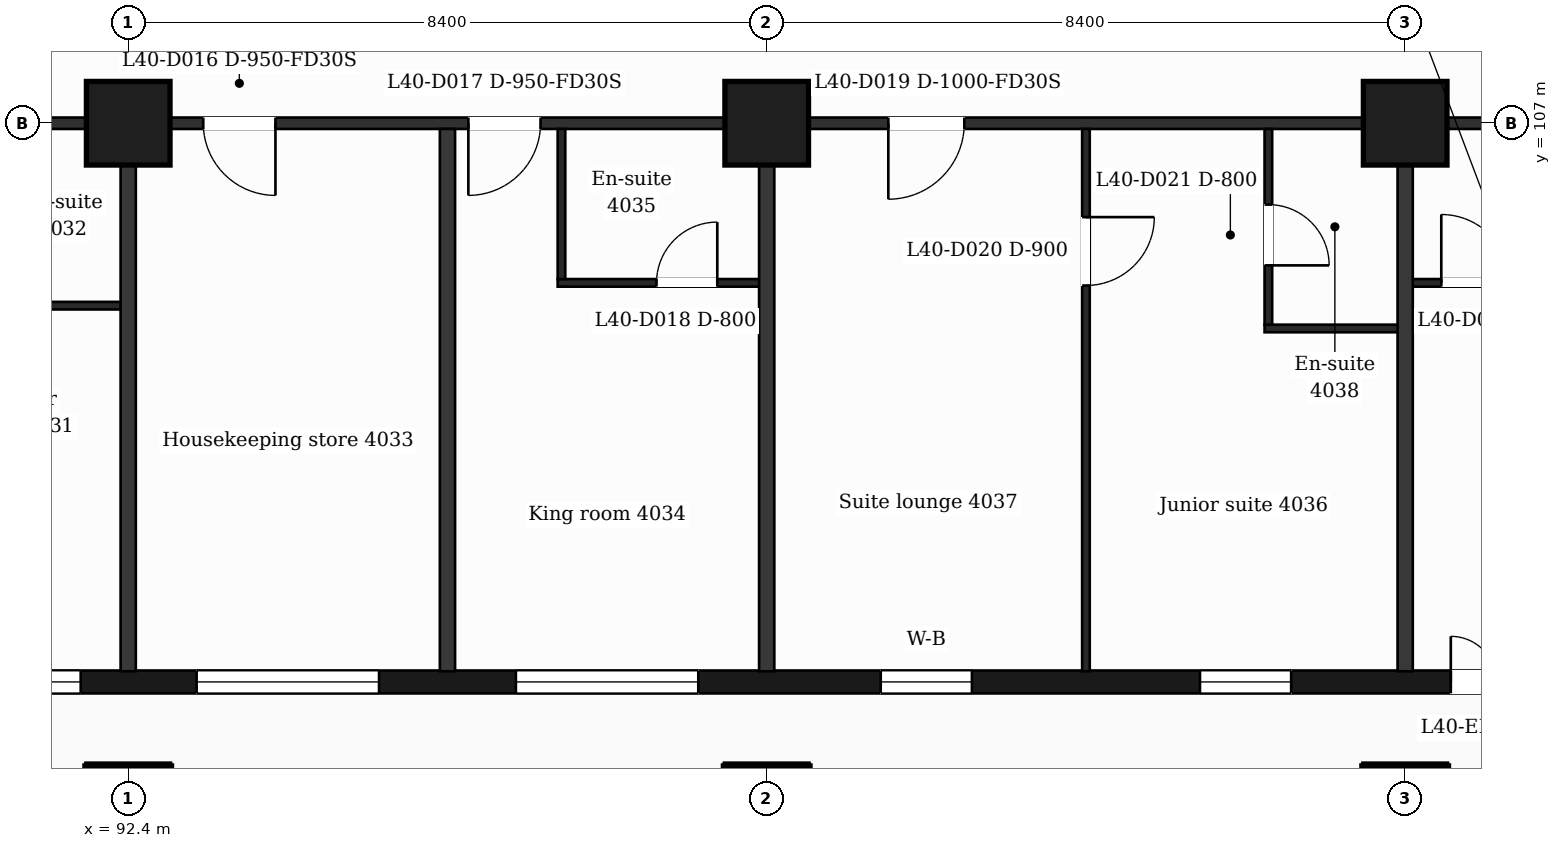
"""IFC4 building model, lengths in metres.
Left out: names, types, materials, properties, quantities, classifications, styles, units other than length and angle.
Written with IfcOpenShell. Run it as: python <this file> out.ifc"""

import sys

from ifc_helpers import new_model, si_unit, direction, frame, frame_2d, origin, origin_2d, place, context, subcontext, project, spatial, rectangle, extrude, element, fill, save


model = new_model("IFC4")
c1 = context("Model", 3, precision=1e-05, world=origin(), true_north=direction((0.0, 1.0)))
c2 = subcontext(c1, "Body", "Model", "MODEL_VIEW")
j1 = project(units=[si_unit("LENGTHUNIT", "METRE"), si_unit("PLANEANGLEUNIT", "RADIAN")], contexts=[c1])
p1 = place(None, origin())
s1 = spatial("IfcSite", under=j1, at=p1, CompositionType="ELEMENT")
p2 = place(p1, origin())
s2 = spatial("IfcBuilding", under=s1, at=p2, CompositionType="ELEMENT")
p3 = place(p2, frame((0.0, 0.0, 170.0)))
s3 = spatial("IfcBuildingStorey", under=s2, at=p3, CompositionType="ELEMENT", Elevation=170.0)
for number, where, z_axis, x_axis in (
    (1, (92.4, 98.0, 0.0), (0.0, 0.0, 1.0), (1.0, 0.0, 0.0)),
    (2, (100.8, 98.0, 0.0), (0.0, 0.0, 1.0), (1.0, 0.0, 0.0)),
    (3, (109.2, 98.0, 0.0), (0.0, 0.0, 1.0), (1.0, 0.0, 0.0)),
    (4, (92.4, 107.0, 0.0), (0.0, 0.0, 1.0), (1.0, 0.0, 0.0)),
    (5, (100.8, 107.0, 0.0), (0.0, 0.0, 1.0), (1.0, 0.0, 0.0)),
    (6, (109.2, 107.0, 0.0), (0.0, 0.0, 1.0), (1.0, 0.0, 0.0)),
):
    element("IfcColumn", number, at=place(p3, frame(where, z_axis=z_axis, x_axis=x_axis)), inside=s3, PredefinedType="COLUMN", context=c2, shape_type="SweptSolid", body=[
        extrude(rectangle(XDim=1.1, YDim=1.1, at=origin_2d()), origin(), (0.0, 0.0, 1.0), 3.7),
    ])
p4 = place(p3, frame((89.85, 99.65, 0.0), z_axis=(0.0, 0.0, 1.0), x_axis=(1.0, 0.0, 0.0)))
e7 = element("IfcWall", 7, at=p4, inside=s3, PredefinedType="SOLIDWALL", context=c2, shape_type="SweptSolid", body=[
    extrude(rectangle(XDim=47.25, YDim=0.3, at=frame_2d((23.625, 0.0))), origin(), (0.0, 0.0, 1.0), 3.38),
])
p5 = place(p4, frame((0.725, 0.0, 0.9)))
e8 = element("IfcOpeningElement", 8, at=p5, cuts=e7, PredefinedType="OPENING", context=c2, shape_type="SweptSolid", body=[
    extrude(rectangle(XDim=1.2, YDim=2.1, at=frame_2d((0.6, 1.05))), frame((0.0, 0.16, 0.0), z_axis=(0.0, -1.0, 0.0), x_axis=(1.0, 0.0, 0.0)), (0.0, 0.0, 1.0), 0.32),
])
p6 = place(p4, frame((3.45, 0.0, 0.9)))
e9 = element("IfcOpeningElement", 9, at=p6, cuts=e7, PredefinedType="OPENING", context=c2, shape_type="SweptSolid", body=[
    extrude(rectangle(XDim=2.4, YDim=2.1, at=frame_2d((1.2, 1.05))), frame((0.0, 0.16, 0.0), z_axis=(0.0, -1.0, 0.0), x_axis=(1.0, 0.0, 0.0)), (0.0, 0.0, 1.0), 0.32),
])
p7 = place(p4, frame((7.65, 0.0, 0.9)))
e10 = element("IfcOpeningElement", 10, at=p7, cuts=e7, PredefinedType="OPENING", context=c2, shape_type="SweptSolid", body=[
    extrude(rectangle(XDim=2.4, YDim=2.1, at=frame_2d((1.2, 1.05))), frame((0.0, 0.16, 0.0), z_axis=(0.0, -1.0, 0.0), x_axis=(1.0, 0.0, 0.0)), (0.0, 0.0, 1.0), 0.32),
])
p8 = place(p4, frame((12.45, 0.0, 0.9)))
e11 = element("IfcOpeningElement", 11, at=p8, cuts=e7, PredefinedType="OPENING", context=c2, shape_type="SweptSolid", body=[
    extrude(rectangle(XDim=1.2, YDim=2.1, at=frame_2d((0.6, 1.05))), frame((0.0, 0.16, 0.0), z_axis=(0.0, -1.0, 0.0), x_axis=(1.0, 0.0, 0.0)), (0.0, 0.0, 1.0), 0.32),
])
p9 = place(p4, frame((16.65, 0.0, 0.9)))
e12 = element("IfcOpeningElement", 12, at=p9, cuts=e7, PredefinedType="OPENING", context=c2, shape_type="SweptSolid", body=[
    extrude(rectangle(XDim=1.2, YDim=2.1, at=frame_2d((0.6, 1.05))), frame((0.0, 0.16, 0.0), z_axis=(0.0, -1.0, 0.0), x_axis=(1.0, 0.0, 0.0)), (0.0, 0.0, 1.0), 0.32),
])
p10 = place(p4, frame((19.95, 0.0, 0.0)))
e13 = element("IfcOpeningElement", 13, at=p10, cuts=e7, PredefinedType="OPENING", context=c2, shape_type="SweptSolid", body=[
    extrude(rectangle(XDim=1.2, YDim=2.4, at=frame_2d((0.6, 1.2))), frame((0.0, 0.16, 0.0), z_axis=(0.0, -1.0, 0.0), x_axis=(1.0, 0.0, 0.0)), (0.0, 0.0, 1.0), 0.32),
])
p11 = place(p4, frame((21.75, 0.0, 0.9)))
e14 = element("IfcOpeningElement", 14, at=p11, cuts=e7, PredefinedType="OPENING", context=c2, shape_type="SweptSolid", body=[
    extrude(rectangle(XDim=1.2, YDim=2.1, at=frame_2d((0.6, 1.05))), frame((0.0, 0.16, 0.0), z_axis=(0.0, -1.0, 0.0), x_axis=(1.0, 0.0, 0.0)), (0.0, 0.0, 1.0), 0.32),
])
p12 = place(p4, frame((24.45, 0.0, 0.9)))
e15 = element("IfcOpeningElement", 15, at=p12, cuts=e7, PredefinedType="OPENING", context=c2, shape_type="SweptSolid", body=[
    extrude(rectangle(XDim=2.4, YDim=2.1, at=frame_2d((1.2, 1.05))), frame((0.0, 0.16, 0.0), z_axis=(0.0, -1.0, 0.0), x_axis=(1.0, 0.0, 0.0)), (0.0, 0.0, 1.0), 0.32),
])
p13 = place(p4, frame((28.35, 0.0, 0.0)))
e16 = element("IfcOpeningElement", 16, at=p13, cuts=e7, PredefinedType="OPENING", context=c2, shape_type="SweptSolid", body=[
    extrude(rectangle(XDim=1.2, YDim=2.4, at=frame_2d((0.6, 1.2))), frame((0.0, 0.16, 0.0), z_axis=(0.0, -1.0, 0.0), x_axis=(1.0, 0.0, 0.0)), (0.0, 0.0, 1.0), 0.32),
])
p14 = place(p4, frame((30.15, 0.0, 0.9)))
e17 = element("IfcOpeningElement", 17, at=p14, cuts=e7, PredefinedType="OPENING", context=c2, shape_type="SweptSolid", body=[
    extrude(rectangle(XDim=1.2, YDim=2.1, at=frame_2d((0.6, 1.05))), frame((0.0, 0.16, 0.0), z_axis=(0.0, -1.0, 0.0), x_axis=(1.0, 0.0, 0.0)), (0.0, 0.0, 1.0), 0.32),
])
p15 = place(p4, frame((32.85, 0.0, 0.9)))
e18 = element("IfcOpeningElement", 18, at=p15, cuts=e7, PredefinedType="OPENING", context=c2, shape_type="SweptSolid", body=[
    extrude(rectangle(XDim=2.4, YDim=2.1, at=frame_2d((1.2, 1.05))), frame((0.0, 0.16, 0.0), z_axis=(0.0, -1.0, 0.0), x_axis=(1.0, 0.0, 0.0)), (0.0, 0.0, 1.0), 0.32),
])
p16 = place(p4, frame((37.05, 0.0, 0.9)))
e19 = element("IfcOpeningElement", 19, at=p16, cuts=e7, PredefinedType="OPENING", context=c2, shape_type="SweptSolid", body=[
    extrude(rectangle(XDim=2.4, YDim=2.1, at=frame_2d((1.2, 1.05))), frame((0.0, 0.16, 0.0), z_axis=(0.0, -1.0, 0.0), x_axis=(1.0, 0.0, 0.0)), (0.0, 0.0, 1.0), 0.32),
])
p17 = place(p4, frame((41.85, 0.0, 0.9)))
e20 = element("IfcOpeningElement", 20, at=p17, cuts=e7, PredefinedType="OPENING", context=c2, shape_type="SweptSolid", body=[
    extrude(rectangle(XDim=1.2, YDim=2.1, at=frame_2d((0.6, 1.05))), frame((0.0, 0.16, 0.0), z_axis=(0.0, -1.0, 0.0), x_axis=(1.0, 0.0, 0.0)), (0.0, 0.0, 1.0), 0.32),
])
p18 = place(p4, frame((45.25, 0.0, 0.9)))
e21 = element("IfcOpeningElement", 21, at=p18, cuts=e7, PredefinedType="OPENING", context=c2, shape_type="SweptSolid", body=[
    extrude(rectangle(XDim=1.2, YDim=2.1, at=frame_2d((0.6, 1.05))), frame((0.0, 0.16, 0.0), z_axis=(0.0, -1.0, 0.0), x_axis=(1.0, 0.0, 0.0)), (0.0, 0.0, 1.0), 0.32),
])
p19 = place(p3, frame((107.35, 104.3, 0.0), z_axis=(0.0, 0.0, 1.0), x_axis=(1.0, 0.0, 0.0)))
e22 = element("IfcWall", 22, at=p19, inside=s3, PredefinedType="PARTITIONING", context=c2, shape_type="SweptSolid", body=[
    extrude(rectangle(XDim=1.85, YDim=0.1, at=frame_2d((0.925, 0.0))), origin(), (0.0, 0.0, 1.0), 3.38),
])
p20 = place(p3, frame((89.95, 104.6, 0.0), z_axis=(0.0, 0.0, 1.0), x_axis=(1.0, 0.0, 0.0)))
e23 = element("IfcWall", 23, at=p20, inside=s3, PredefinedType="PARTITIONING", context=c2, shape_type="SweptSolid", body=[
    extrude(rectangle(XDim=2.45, YDim=0.1, at=frame_2d((1.225, 0.0))), origin(), (0.0, 0.0, 1.0), 3.38),
])
p21 = place(p3, frame((98.05, 104.9, 0.0), z_axis=(0.0, 0.0, 1.0), x_axis=(1.0, 0.0, 0.0)))
e24 = element("IfcWall", 24, at=p21, inside=s3, PredefinedType="PARTITIONING", context=c2, shape_type="SweptSolid", body=[
    extrude(rectangle(XDim=2.75, YDim=0.1, at=frame_2d((1.375, 0.0))), origin(), (0.0, 0.0, 1.0), 3.38),
])
p22 = place(p21, frame((1.3, 0.0, 0.0)))
e25 = element("IfcOpeningElement", 25, at=p22, cuts=e24, PredefinedType="OPENING", context=c2, shape_type="SweptSolid", body=[
    extrude(rectangle(XDim=0.8, YDim=2.1, at=frame_2d((0.4, 1.05))), frame((0.0, 0.06, 0.0), z_axis=(0.0, -1.0, 0.0), x_axis=(1.0, 0.0, 0.0)), (0.0, 0.0, 1.0), 0.12),
])
p23 = place(p3, frame((109.2, 104.9, 0.0), z_axis=(0.0, 0.0, 1.0), x_axis=(1.0, 0.0, 0.0)))
e26 = element("IfcWall", 26, at=p23, inside=s3, PredefinedType="PARTITIONING", context=c2, shape_type="SweptSolid", body=[
    extrude(rectangle(XDim=2.15, YDim=0.1, at=frame_2d((1.075, 0.0))), origin(), (0.0, 0.0, 1.0), 3.38),
])
p24 = place(p23, frame((0.475, 0.0, 0.0)))
e27 = element("IfcOpeningElement", 27, at=p24, cuts=e26, PredefinedType="OPENING", context=c2, shape_type="SweptSolid", body=[
    extrude(rectangle(XDim=0.9, YDim=2.1, at=frame_2d((0.45, 1.05))), frame((0.0, 0.06, 0.0), z_axis=(0.0, -1.0, 0.0), x_axis=(1.0, 0.0, 0.0)), (0.0, 0.0, 1.0), 0.12),
])
p25 = place(p3, frame((87.018, 107.0, 0.0), z_axis=(0.0, 0.0, 1.0), x_axis=(1.0, 0.0, 0.0)))
e28 = element("IfcWall", 28, at=p25, inside=s3, PredefinedType="PARTITIONING", context=c2, shape_type="SweptSolid", body=[
    extrude(rectangle(XDim=52.765, YDim=0.15, at=frame_2d((26.382, 0.0))), origin(), (0.0, 0.0, 1.0), 3.38),
])
p26 = place(p25, frame((0.463, 0.0, 0.0)))
e29 = element("IfcOpeningElement", 29, at=p26, cuts=e28, PredefinedType="OPENING", context=c2, shape_type="SweptSolid", body=[
    extrude(rectangle(XDim=0.95, YDim=2.1, at=frame_2d((0.475, 1.05))), frame((0.0, 0.085, 0.0), z_axis=(0.0, -1.0, 0.0), x_axis=(1.0, 0.0, 0.0)), (0.0, 0.0, 1.0), 0.17),
])
p27 = place(p25, frame((6.369, 0.0, 0.0)))
e30 = element("IfcOpeningElement", 30, at=p27, cuts=e28, PredefinedType="OPENING", context=c2, shape_type="SweptSolid", body=[
    extrude(rectangle(XDim=0.95, YDim=2.1, at=frame_2d((0.475, 1.05))), frame((0.0, 0.085, 0.0), z_axis=(0.0, -1.0, 0.0), x_axis=(1.0, 0.0, 0.0)), (0.0, 0.0, 1.0), 0.17),
])
p28 = place(p25, frame((9.857, 0.0, 0.0)))
e31 = element("IfcOpeningElement", 31, at=p28, cuts=e28, PredefinedType="OPENING", context=c2, shape_type="SweptSolid", body=[
    extrude(rectangle(XDim=0.95, YDim=2.1, at=frame_2d((0.475, 1.05))), frame((0.0, 0.085, 0.0), z_axis=(0.0, -1.0, 0.0), x_axis=(1.0, 0.0, 0.0)), (0.0, 0.0, 1.0), 0.17),
])
p29 = place(p25, frame((15.382, 0.0, 0.0)))
e32 = element("IfcOpeningElement", 32, at=p29, cuts=e28, PredefinedType="OPENING", context=c2, shape_type="SweptSolid", body=[
    extrude(rectangle(XDim=1.0, YDim=2.1, at=frame_2d((0.5, 1.05))), frame((0.0, 0.085, 0.0), z_axis=(0.0, -1.0, 0.0), x_axis=(1.0, 0.0, 0.0)), (0.0, 0.0, 1.0), 0.17),
])
p30 = place(p25, frame((24.932, 0.0, 0.0)))
e33 = element("IfcOpeningElement", 33, at=p30, cuts=e28, PredefinedType="OPENING", context=c2, shape_type="SweptSolid", body=[
    extrude(rectangle(XDim=1.0, YDim=2.1, at=frame_2d((0.5, 1.05))), frame((0.0, 0.085, 0.0), z_axis=(0.0, -1.0, 0.0), x_axis=(1.0, 0.0, 0.0)), (0.0, 0.0, 1.0), 0.17),
])
p31 = place(p25, frame((27.819, 0.0, 0.0)))
e34 = element("IfcOpeningElement", 34, at=p31, cuts=e28, PredefinedType="OPENING", context=c2, shape_type="SweptSolid", body=[
    extrude(rectangle(XDim=0.95, YDim=2.1, at=frame_2d((0.475, 1.05))), frame((0.0, 0.085, 0.0), z_axis=(0.0, -1.0, 0.0), x_axis=(1.0, 0.0, 0.0)), (0.0, 0.0, 1.0), 0.17),
])
p32 = place(p25, frame((42.012, 0.0, 0.0)))
e35 = element("IfcOpeningElement", 35, at=p32, cuts=e28, PredefinedType="OPENING", context=c2, shape_type="SweptSolid", body=[
    extrude(rectangle(XDim=1.0, YDim=2.1, at=frame_2d((0.5, 1.05))), frame((0.0, 0.085, 0.0), z_axis=(0.0, -1.0, 0.0), x_axis=(1.0, 0.0, 0.0)), (0.0, 0.0, 1.0), 0.17),
])
p33 = place(p25, frame((48.249, 0.0, 0.0)))
e36 = element("IfcOpeningElement", 36, at=p33, cuts=e28, PredefinedType="OPENING", context=c2, shape_type="SweptSolid", body=[
    extrude(rectangle(XDim=0.95, YDim=2.1, at=frame_2d((0.475, 1.05))), frame((0.0, 0.085, 0.0), z_axis=(0.0, -1.0, 0.0), x_axis=(1.0, 0.0, 0.0)), (0.0, 0.0, 1.0), 0.17),
])
for number, where, z_axis, x_axis in (
    (37, (92.4, 99.79, 0.0), (0.0, 0.0, 1.0), (0.0, 1.0, 0.0)),
    (38, (96.6, 99.79, 0.0), (0.0, 0.0, 1.0), (0.0, 1.0, 0.0)),
):
    element("IfcWall", number, at=place(p3, frame(where, z_axis=z_axis, x_axis=x_axis)), inside=s3, PredefinedType="PARTITIONING", context=c2, shape_type="SweptSolid", body=[
        extrude(rectangle(XDim=7.135, YDim=0.2, at=frame_2d((3.567, 0.0))), origin(), (0.0, 0.0, 1.0), 3.38),
    ])
p34 = place(p3, frame((98.1, 104.95, 0.0), z_axis=(0.0, 0.0, 1.0), x_axis=(0.0, 1.0, 0.0)))
e39 = element("IfcWall", 39, at=p34, inside=s3, PredefinedType="PARTITIONING", context=c2, shape_type="SweptSolid", body=[
    extrude(rectangle(XDim=1.975, YDim=0.1, at=frame_2d((0.988, 0.0))), origin(), (0.0, 0.0, 1.0), 3.38),
])
p35 = place(p3, frame((100.8, 99.79, 0.0), z_axis=(0.0, 0.0, 1.0), x_axis=(0.0, 1.0, 0.0)))
e40 = element("IfcWall", 40, at=p35, inside=s3, PredefinedType="PARTITIONING", context=c2, shape_type="SweptSolid", body=[
    extrude(rectangle(XDim=7.135, YDim=0.2, at=frame_2d((3.567, 0.0))), origin(), (0.0, 0.0, 1.0), 3.38),
])
p36 = place(p3, frame((105.0, 99.79, 0.0), z_axis=(0.0, 0.0, 1.0), x_axis=(0.0, 1.0, 0.0)))
e41 = element("IfcWall", 41, at=p36, inside=s3, PredefinedType="PARTITIONING", context=c2, shape_type="SweptSolid", body=[
    extrude(rectangle(XDim=7.135, YDim=0.1, at=frame_2d((3.567, 0.0))), origin(), (0.0, 0.0, 1.0), 3.38),
])
p37 = place(p36, frame((5.075, 0.0, 0.0)))
e42 = element("IfcOpeningElement", 42, at=p37, cuts=e41, PredefinedType="OPENING", context=c2, shape_type="SweptSolid", body=[
    extrude(rectangle(XDim=0.9, YDim=2.1, at=frame_2d((0.45, 1.05))), frame((0.0, 0.06, 0.0), z_axis=(0.0, -1.0, 0.0), x_axis=(1.0, 0.0, 0.0)), (0.0, 0.0, 1.0), 0.12),
])
p38 = place(p3, frame((107.4, 104.35, 0.0), z_axis=(0.0, 0.0, 1.0), x_axis=(0.0, 1.0, 0.0)))
e43 = element("IfcWall", 43, at=p38, inside=s3, PredefinedType="PARTITIONING", context=c2, shape_type="SweptSolid", body=[
    extrude(rectangle(XDim=2.575, YDim=0.1, at=frame_2d((1.288, 0.0))), origin(), (0.0, 0.0, 1.0), 3.38),
])
p39 = place(p38, frame((0.78, 0.0, 0.0)))
e44 = element("IfcOpeningElement", 44, at=p39, cuts=e43, PredefinedType="OPENING", context=c2, shape_type="SweptSolid", body=[
    extrude(rectangle(XDim=0.8, YDim=2.1, at=frame_2d((0.4, 1.05))), frame((0.0, 0.06, 0.0), z_axis=(0.0, -1.0, 0.0), x_axis=(1.0, 0.0, 0.0)), (0.0, 0.0, 1.0), 0.12),
])
p40 = place(p3, frame((109.2, 99.79, 0.0), z_axis=(0.0, 0.0, 1.0), x_axis=(0.0, 1.0, 0.0)))
e45 = element("IfcWall", 45, at=p40, inside=s3, PredefinedType="PARTITIONING", context=c2, shape_type="SweptSolid", body=[
    extrude(rectangle(XDim=7.135, YDim=0.2, at=frame_2d((3.567, 0.0))), origin(), (0.0, 0.0, 1.0), 3.38),
])
p41 = place(p5, origin())
e46 = element("IfcWindow", 46, at=p41, inside=s3, PartitioningType="SINGLE_PANEL", PredefinedType="WINDOW", context=c2, shape_type="SweptSolid", body=[
    extrude(rectangle(XDim=1.2, YDim=2.1, at=frame_2d((0.6, 1.05))), frame((0.0, 0.03, 0.0), z_axis=(0.0, -1.0, 0.0), x_axis=(1.0, 0.0, 0.0)), (0.0, 0.0, 1.0), 0.06),
])
fill(e8, e46)
p42 = place(p6, origin())
e47 = element("IfcWindow", 47, at=p42, inside=s3, PartitioningType="SINGLE_PANEL", PredefinedType="WINDOW", context=c2, shape_type="SweptSolid", body=[
    extrude(rectangle(XDim=2.4, YDim=2.1, at=frame_2d((1.2, 1.05))), frame((0.0, 0.03, 0.0), z_axis=(0.0, -1.0, 0.0), x_axis=(1.0, 0.0, 0.0)), (0.0, 0.0, 1.0), 0.06),
])
fill(e9, e47)
p43 = place(p7, origin())
e48 = element("IfcWindow", 48, at=p43, inside=s3, PartitioningType="SINGLE_PANEL", PredefinedType="WINDOW", context=c2, shape_type="SweptSolid", body=[
    extrude(rectangle(XDim=2.4, YDim=2.1, at=frame_2d((1.2, 1.05))), frame((0.0, 0.03, 0.0), z_axis=(0.0, -1.0, 0.0), x_axis=(1.0, 0.0, 0.0)), (0.0, 0.0, 1.0), 0.06),
])
fill(e10, e48)
p44 = place(p8, origin())
e49 = element("IfcWindow", 49, at=p44, inside=s3, PartitioningType="SINGLE_PANEL", PredefinedType="WINDOW", context=c2, shape_type="SweptSolid", body=[
    extrude(rectangle(XDim=1.2, YDim=2.1, at=frame_2d((0.6, 1.05))), frame((0.0, 0.03, 0.0), z_axis=(0.0, -1.0, 0.0), x_axis=(1.0, 0.0, 0.0)), (0.0, 0.0, 1.0), 0.06),
])
fill(e11, e49)
p45 = place(p9, origin())
e50 = element("IfcWindow", 50, at=p45, inside=s3, PartitioningType="SINGLE_PANEL", PredefinedType="WINDOW", context=c2, shape_type="SweptSolid", body=[
    extrude(rectangle(XDim=1.2, YDim=2.1, at=frame_2d((0.6, 1.05))), frame((0.0, 0.03, 0.0), z_axis=(0.0, -1.0, 0.0), x_axis=(1.0, 0.0, 0.0)), (0.0, 0.0, 1.0), 0.06),
])
fill(e12, e50)
p46 = place(p10, origin())
e51 = element("IfcDoor", 51, at=p46, inside=s3, OperationType="DOUBLE_DOOR_SINGLE_SWING", PredefinedType="DOOR", context=c2, shape_type="SweptSolid", body=[
    extrude(rectangle(XDim=1.2, YDim=2.4, at=frame_2d((0.6, 1.2))), frame((0.0, 0.025, 0.0), z_axis=(0.0, -1.0, 0.0), x_axis=(1.0, 0.0, 0.0)), (0.0, 0.0, 1.0), 0.05),
])
fill(e13, e51)
p47 = place(p27, origin())
e52 = element("IfcDoor", 52, at=p47, inside=s3, OperationType="SINGLE_SWING_RIGHT", PredefinedType="DOOR", context=c2, shape_type="SweptSolid", body=[
    extrude(rectangle(XDim=0.95, YDim=2.1, at=frame_2d((0.475, 1.05))), frame((0.0, 0.025, 0.0), z_axis=(0.0, -1.0, 0.0), x_axis=(1.0, 0.0, 0.0)), (0.0, 0.0, 1.0), 0.05),
])
fill(e30, e52)
p48 = place(p28, origin())
e53 = element("IfcDoor", 53, at=p48, inside=s3, OperationType="SINGLE_SWING_LEFT", PredefinedType="DOOR", context=c2, shape_type="SweptSolid", body=[
    extrude(rectangle(XDim=0.95, YDim=2.1, at=frame_2d((0.475, 1.05))), frame((0.0, 0.025, 0.0), z_axis=(0.0, -1.0, 0.0), x_axis=(1.0, 0.0, 0.0)), (0.0, 0.0, 1.0), 0.05),
])
fill(e31, e53)
p49 = place(p22, origin())
e54 = element("IfcDoor", 54, at=p49, inside=s3, OperationType="SINGLE_SWING_RIGHT", PredefinedType="DOOR", context=c2, shape_type="SweptSolid", body=[
    extrude(rectangle(XDim=0.8, YDim=2.1, at=frame_2d((0.4, 1.05))), frame((0.0, 0.025, 0.0), z_axis=(0.0, -1.0, 0.0), x_axis=(1.0, 0.0, 0.0)), (0.0, 0.0, 1.0), 0.05),
])
fill(e25, e54)
p50 = place(p29, origin())
e55 = element("IfcDoor", 55, at=p50, inside=s3, OperationType="SINGLE_SWING_LEFT", PredefinedType="DOOR", context=c2, shape_type="SweptSolid", body=[
    extrude(rectangle(XDim=1.0, YDim=2.1, at=frame_2d((0.5, 1.05))), frame((0.0, 0.025, 0.0), z_axis=(0.0, -1.0, 0.0), x_axis=(1.0, 0.0, 0.0)), (0.0, 0.0, 1.0), 0.05),
])
fill(e32, e55)
p51 = place(p37, origin())
e56 = element("IfcDoor", 56, at=p51, inside=s3, OperationType="SINGLE_SWING_RIGHT", PredefinedType="DOOR", context=c2, shape_type="SweptSolid", body=[
    extrude(rectangle(XDim=0.9, YDim=2.1, at=frame_2d((0.45, 1.05))), frame((0.0, 0.025, 0.0), z_axis=(0.0, -1.0, 0.0), x_axis=(1.0, 0.0, 0.0)), (0.0, 0.0, 1.0), 0.05),
])
fill(e42, e56)
p52 = place(p39, origin())
e57 = element("IfcDoor", 57, at=p52, inside=s3, OperationType="SINGLE_SWING_LEFT", PredefinedType="DOOR", context=c2, shape_type="SweptSolid", body=[
    extrude(rectangle(XDim=0.8, YDim=2.1, at=frame_2d((0.4, 1.05))), frame((0.0, 0.025, 0.0), z_axis=(0.0, -1.0, 0.0), x_axis=(1.0, 0.0, 0.0)), (0.0, 0.0, 1.0), 0.05),
])
fill(e44, e57)
p53 = place(p24, origin())
e58 = element("IfcDoor", 58, at=p53, inside=s3, OperationType="SINGLE_SWING_LEFT", PredefinedType="DOOR", context=c2, shape_type="SweptSolid", body=[
    extrude(rectangle(XDim=0.9, YDim=2.1, at=frame_2d((0.45, 1.05))), frame((0.0, 0.025, 0.0), z_axis=(0.0, -1.0, 0.0), x_axis=(1.0, 0.0, 0.0)), (0.0, 0.0, 1.0), 0.05),
])
fill(e27, e58)
save(model, sys.argv[1])
